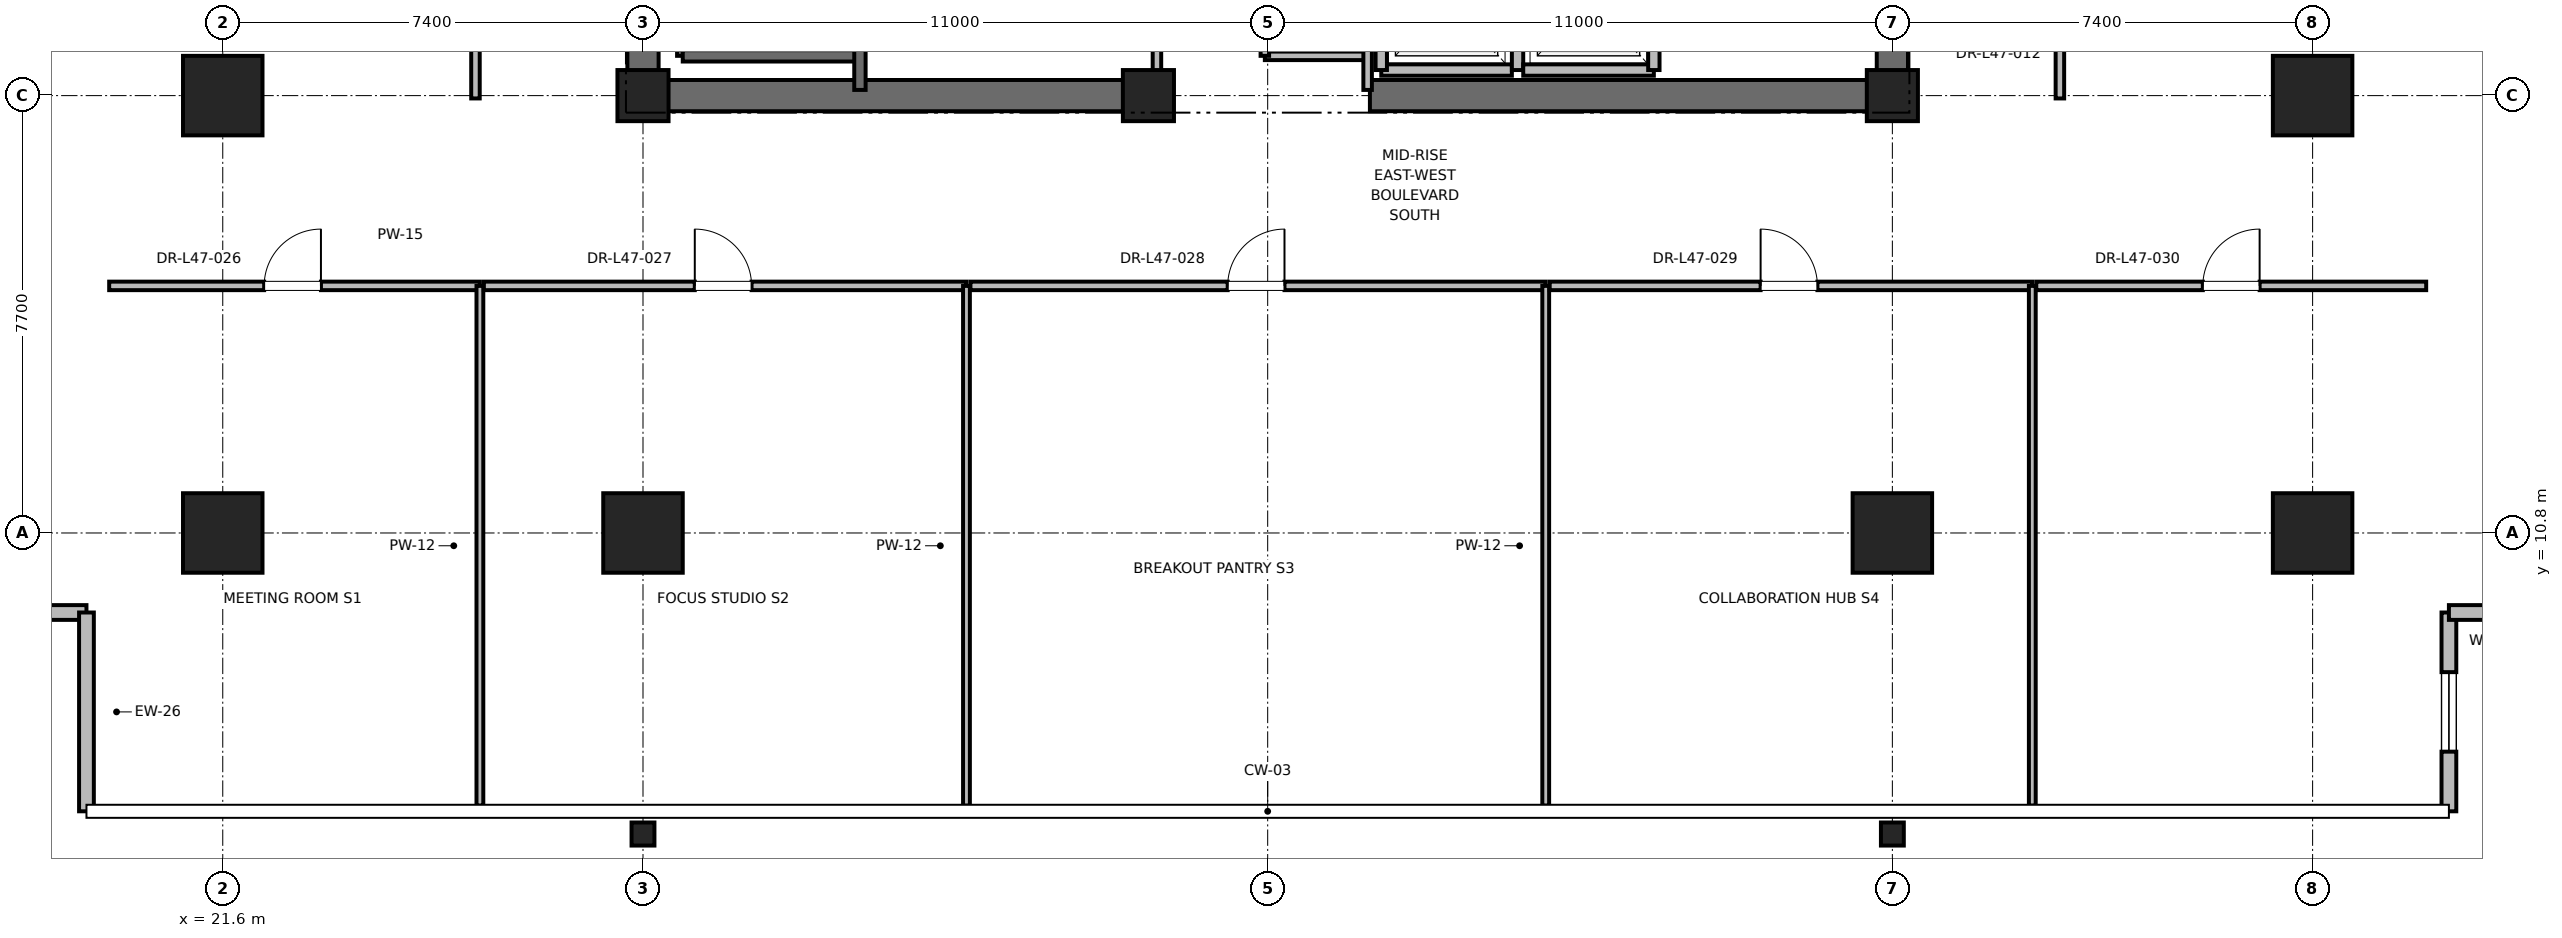
"""IFC4 building model, lengths in metres.
Left out: names, types, materials, properties, quantities, classifications, styles, units other than length and angle.
Written with IfcOpenShell. Run it as: python <this file> out.ifc"""

import sys

from ifc_helpers import new_model, si_unit, direction, frame, frame_2d, origin, origin_2d, place, context, subcontext, project, spatial, rectangle, i_section, extrude, element, fill, save


model = new_model("IFC4")
c1 = context("Model", 3, precision=1e-05, world=origin(), true_north=direction((0.0, 1.0)))
c2 = subcontext(c1, "Body", "Model", "MODEL_VIEW")
j1 = project(units=[si_unit("LENGTHUNIT", "METRE"), si_unit("PLANEANGLEUNIT", "RADIAN")], contexts=[c1])
p1 = place(None, origin())
s1 = spatial("IfcSite", under=j1, at=p1, CompositionType="ELEMENT")
p2 = place(p1, origin())
s2 = spatial("IfcBuilding", under=s1, at=p2, CompositionType="ELEMENT")
p3 = place(p2, frame((0.0, 0.0, 205.2)))
s3 = spatial("IfcBuildingStorey", under=s2, at=p3, CompositionType="ELEMENT", Elevation=205.2)
for number, where, z_axis, x_axis in (
    (1, (29.0, 10.8, 0.0), (0.0, 0.0, 1.0), (1.0, 0.0, 0.0)),
    (2, (51.0, 10.8, 0.0), (0.0, 0.0, 1.0), (1.0, 0.0, 0.0)),
    (3, (21.6, 18.5, 0.0), (0.0, 0.0, 1.0), (1.0, 0.0, 0.0)),
    (4, (58.4, 18.5, 0.0), (0.0, 0.0, 1.0), (1.0, 0.0, 0.0)),
    (5, (21.6, 10.8, 0.0), (0.0, 0.0, 1.0), (1.0, 0.0, 0.0)),
    (6, (58.4, 10.8, 0.0), (0.0, 0.0, 1.0), (1.0, 0.0, 0.0)),
):
    element("IfcColumn", number, at=place(p3, frame(where, z_axis=z_axis, x_axis=x_axis)), inside=s3, PredefinedType="COLUMN", context=c2, shape_type="SweptSolid", body=[
        extrude(rectangle(XDim=1.4, YDim=1.4, at=origin_2d()), origin(), (0.0, 0.0, 1.0), 4.0),
    ])
for number, where, z_axis, x_axis in (
    (7, (29.0, 5.5, 0.0), (0.0, 0.0, 1.0), (1.0, 0.0, 0.0)),
    (8, (51.0, 5.5, 0.0), (0.0, 0.0, 1.0), (1.0, 0.0, 0.0)),
):
    element("IfcColumn", number, at=place(p3, frame(where, z_axis=z_axis, x_axis=x_axis)), inside=s3, PredefinedType="COLUMN", context=c2, shape_type="SweptSolid", body=[
        extrude(i_section(OverallWidth=0.403, OverallDepth=0.406, WebThickness=0.027, FlangeThickness=0.043, FilletRadius=0.015, at=origin_2d()), origin(), (0.0, 0.0, 1.0), 4.0),
    ])
for number, where, z_axis, x_axis in (
    (9, (29.0, 18.5, 0.0), (0.0, 0.0, 1.0), (1.0, 0.0, 0.0)),
    (10, (51.0, 18.5, 0.0), (0.0, 0.0, 1.0), (1.0, 0.0, 0.0)),
    (11, (37.9, 18.5, 0.0), (0.0, 0.0, 1.0), (1.0, 0.0, 0.0)),
):
    element("IfcColumn", number, at=place(p3, frame(where, z_axis=z_axis, x_axis=x_axis)), inside=s3, PredefinedType="PILASTER", context=c2, shape_type="SweptSolid", body=[
        extrude(rectangle(XDim=0.9, YDim=0.9, at=origin_2d()), origin(), (0.0, 0.0, 1.0), 4.0),
    ])
for number, where, z_axis, x_axis in (
    (12, (29.0, 18.5, 0.0), (0.0, 0.0, 1.0), (1.0, 0.0, 0.0)),
    (13, (41.8, 18.5, 0.0), (0.0, 0.0, 1.0), (1.0, 0.0, 0.0)),
):
    element("IfcWall", number, at=place(p3, frame(where, z_axis=z_axis, x_axis=x_axis)), inside=s3, PredefinedType="SHEAR", context=c2, shape_type="SweptSolid", body=[
        extrude(rectangle(XDim=9.2, YDim=0.55, at=frame_2d((4.6, 0.0))), origin(), (0.0, 0.0, 1.0), 3.775),
    ])
p4 = place(p3, frame((29.0, 18.5, 0.0), z_axis=(0.0, 0.0, 1.0), x_axis=(0.0, 1.0, 0.0)))
e14 = element("IfcWall", 14, at=p4, inside=s3, PredefinedType="SHEAR", context=c2, shape_type="SweptSolid", body=[
    extrude(rectangle(XDim=8.8, YDim=0.55, at=frame_2d((4.4, 0.0))), origin(), (0.0, 0.0, 1.0), 3.775),
])
p5 = place(p3, frame((51.0, 18.5, 0.0), z_axis=(0.0, 0.0, 1.0), x_axis=(0.0, 1.0, 0.0)))
e15 = element("IfcWall", 15, at=p5, inside=s3, PredefinedType="SHEAR", context=c2, shape_type="SweptSolid", body=[
    extrude(rectangle(XDim=5.8, YDim=0.55, at=frame_2d((2.9, 0.0))), origin(), (0.0, 0.0, 1.0), 3.775),
])
p6 = place(p3, frame((15.2, 9.4, 0.0), z_axis=(0.0, 0.0, 1.0), x_axis=(1.0, 0.0, 0.0)))
e16 = element("IfcWall", 16, at=p6, inside=s3, PredefinedType="PARAPET", context=c2, shape_type="SweptSolid", body=[
    extrude(rectangle(XDim=4.0, YDim=0.26, at=frame_2d((2.0, 0.0))), origin(), (0.0, 0.0, 1.0), 3.775),
])
p7 = place(p6, frame((1.3, 0.0, 0.85)))
e17 = element("IfcOpeningElement", 17, at=p7, cuts=e16, PredefinedType="OPENING", context=c2, shape_type="SweptSolid", body=[
    extrude(rectangle(XDim=1.4, YDim=2.0, at=frame_2d((0.7, 1.0))), frame((0.0, 0.13, 0.0), z_axis=(0.0, -1.0, 0.0), x_axis=(1.0, 0.0, 0.0)), (0.0, 0.0, 1.0), 0.26),
])
p8 = place(p3, frame((19.2, 9.4, 0.0), z_axis=(0.0, 0.0, 1.0), x_axis=(0.0, -1.0, 0.0)))
e18 = element("IfcWall", 18, at=p8, inside=s3, PredefinedType="PARAPET", context=c2, shape_type="SweptSolid", body=[
    extrude(rectangle(XDim=3.5, YDim=0.26, at=frame_2d((1.75, 0.0))), origin(), (0.0, 0.0, 1.0), 3.775),
])
p9 = place(p3, frame((60.8, 5.9, 0.0), z_axis=(0.0, 0.0, 1.0), x_axis=(0.0, 1.0, 0.0)))
e19 = element("IfcWall", 19, at=p9, inside=s3, PredefinedType="PARAPET", context=c2, shape_type="SweptSolid", body=[
    extrude(rectangle(XDim=3.5, YDim=0.26, at=frame_2d((1.75, 0.0))), origin(), (0.0, 0.0, 1.0), 3.775),
])
p10 = place(p9, frame((1.05, 0.0, 0.85)))
e20 = element("IfcOpeningElement", 20, at=p10, cuts=e19, PredefinedType="OPENING", context=c2, shape_type="SweptSolid", body=[
    extrude(rectangle(XDim=1.4, YDim=2.0, at=frame_2d((0.7, 1.0))), frame((0.0, 0.13, 0.0), z_axis=(0.0, -1.0, 0.0), x_axis=(1.0, 0.0, 0.0)), (0.0, 0.0, 1.0), 0.26),
])
p11 = place(p3, frame((60.8, 9.4, 0.0), z_axis=(0.0, 0.0, 1.0), x_axis=(1.0, 0.0, 0.0)))
e21 = element("IfcWall", 21, at=p11, inside=s3, PredefinedType="PARAPET", context=c2, shape_type="SweptSolid", body=[
    extrude(rectangle(XDim=4.0, YDim=0.26, at=frame_2d((2.0, 0.0))), origin(), (0.0, 0.0, 1.0), 3.775),
])
p12 = place(p3, frame((29.7, 19.2, 0.0), z_axis=(0.0, 0.0, 1.0), x_axis=(0.0, 1.0, 0.0)))
e22 = element("IfcWall", 22, at=p12, inside=s3, PredefinedType="SOLIDWALL", context=c2, shape_type="SweptSolid", body=[
    extrude(rectangle(XDim=8.15, YDim=0.2, at=frame_2d((4.075, 0.0))), origin(), (0.0, 0.0, 1.0), 3.775),
])
p13 = place(p3, frame((29.7, 19.2, 0.0), z_axis=(0.0, 0.0, 1.0), x_axis=(1.0, 0.0, 0.0)))
e23 = element("IfcWall", 23, at=p13, inside=s3, PredefinedType="SOLIDWALL", context=c2, shape_type="SweptSolid", body=[
    extrude(rectangle(XDim=3.12, YDim=0.2, at=frame_2d((1.56, 0.0))), origin(), (0.0, 0.0, 1.0), 3.775),
])
p14 = place(p3, frame((32.82, 18.6, 0.0), z_axis=(0.0, 0.0, 1.0), x_axis=(0.0, 1.0, 0.0)))
e24 = element("IfcWall", 24, at=p14, inside=s3, PredefinedType="SOLIDWALL", context=c2, shape_type="SweptSolid", body=[
    extrude(rectangle(XDim=8.78, YDim=0.2, at=frame_2d((4.39, 0.0))), origin(), (0.0, 0.0, 1.0), 3.775),
])
p15 = place(p3, frame((42.0, 18.95, 0.0), z_axis=(0.0, 0.0, 1.0), x_axis=(1.0, 0.0, 0.0)))
e25 = element("IfcWall", 25, at=p15, inside=s3, PredefinedType="SOLIDWALL", context=c2, shape_type="SweptSolid", body=[
    extrude(rectangle(XDim=2.3, YDim=0.2, at=frame_2d((1.15, 0.0))), origin(), (0.0, 0.0, 1.0), 2.755),
])
p16 = place(p3, frame((42.0, 21.55, 0.0), z_axis=(0.0, 0.0, 1.0), x_axis=(0.0, -1.0, 0.0)))
e26 = element("IfcWall", 26, at=p16, inside=s3, PredefinedType="SOLIDWALL", context=c2, shape_type="SweptSolid", body=[
    extrude(rectangle(XDim=2.6, YDim=0.2, at=frame_2d((1.3, 0.0))), origin(), (0.0, 0.0, 1.0), 2.755),
])
p17 = place(p3, frame((44.4, 18.95, 0.0), z_axis=(0.0, 0.0, 1.0), x_axis=(0.0, 1.0, 0.0)))
e27 = element("IfcWall", 27, at=p17, inside=s3, PredefinedType="SOLIDWALL", context=c2, shape_type="SweptSolid", body=[
    extrude(rectangle(XDim=2.6, YDim=0.2, at=frame_2d((1.3, 0.0))), origin(), (0.0, 0.0, 1.0), 3.775),
])
p18 = place(p3, frame((44.5, 18.95, 0.0), z_axis=(0.0, 0.0, 1.0), x_axis=(1.0, 0.0, 0.0)))
e28 = element("IfcWall", 28, at=p18, inside=s3, PredefinedType="SOLIDWALL", context=c2, shape_type="SweptSolid", body=[
    extrude(rectangle(XDim=2.3, YDim=0.2, at=frame_2d((1.15, 0.0))), origin(), (0.0, 0.0, 1.0), 3.775),
])
p19 = place(p3, frame((46.8, 18.95, 0.0), z_axis=(0.0, 0.0, 1.0), x_axis=(0.0, 1.0, 0.0)))
e29 = element("IfcWall", 29, at=p19, inside=s3, PredefinedType="SOLIDWALL", context=c2, shape_type="SweptSolid", body=[
    extrude(rectangle(XDim=2.6, YDim=0.2, at=frame_2d((1.3, 0.0))), origin(), (0.0, 0.0, 1.0), 3.775),
])
p20 = place(p3, frame((39.95, 19.2, 0.0), z_axis=(0.0, 0.0, 1.0), x_axis=(1.0, 0.0, 0.0)))
e30 = element("IfcWall", 30, at=p20, inside=s3, PredefinedType="PARTITIONING", context=c2, shape_type="SweptSolid", body=[
    extrude(rectangle(XDim=1.81, YDim=0.15, at=frame_2d((0.905, 0.0))), origin(), (0.0, 0.0, 1.0), 2.85),
])
p21 = place(p3, frame((41.76, 18.6, 0.0), z_axis=(0.0, 0.0, 1.0), x_axis=(0.0, 1.0, 0.0)))
e31 = element("IfcWall", 31, at=p21, inside=s3, PredefinedType="PARTITIONING", context=c2, shape_type="SweptSolid", body=[
    extrude(rectangle(XDim=3.6, YDim=0.15, at=frame_2d((1.8, 0.0))), origin(), (0.0, 0.0, 1.0), 2.755),
])
p22 = place(p3, frame((39.95, 19.2, 0.0), z_axis=(0.0, 0.0, 1.0), x_axis=(0.0, 1.0, 0.0)))
e32 = element("IfcWall", 32, at=p22, inside=s3, PredefinedType="PARTITIONING", context=c2, shape_type="SweptSolid", body=[
    extrude(rectangle(XDim=3.0, YDim=0.15, at=frame_2d((1.5, 0.0))), origin(), (0.0, 0.0, 1.0), 2.85),
])
p23 = place(p22, frame((1.05, 0.0, 0.0)))
e33 = element("IfcOpeningElement", 33, at=p23, cuts=e32, PredefinedType="OPENING", context=c2, shape_type="SweptSolid", body=[
    extrude(rectangle(XDim=0.9, YDim=2.1, at=frame_2d((0.45, 1.05))), frame((0.0, 0.075, 0.0), z_axis=(0.0, -1.0, 0.0), x_axis=(1.0, 0.0, 0.0)), (0.0, 0.0, 1.0), 0.15),
])
p24 = place(p3, frame((38.05, 18.6, 0.0), z_axis=(0.0, 0.0, 1.0), x_axis=(0.0, 1.0, 0.0)))
e34 = element("IfcWall", 34, at=p24, inside=s3, PredefinedType="PARTITIONING", context=c2, shape_type="SweptSolid", body=[
    extrude(rectangle(XDim=4.46, YDim=0.15, at=frame_2d((2.23, 0.0))), origin(), (0.0, 0.0, 1.0), 2.755),
])
p25 = place(p24, frame((1.73, 0.0, 0.0)))
e35 = element("IfcOpeningElement", 35, at=p25, cuts=e34, PredefinedType="OPENING", context=c2, shape_type="SweptSolid", body=[
    extrude(rectangle(XDim=1.0, YDim=2.15, at=frame_2d((0.5, 1.075))), frame((0.0, 0.075, 0.0), z_axis=(0.0, -1.0, 0.0), x_axis=(1.0, 0.0, 0.0)), (0.0, 0.0, 1.0), 0.15),
])
p26 = place(p3, frame((19.6, 15.15, 0.0), z_axis=(0.0, 0.0, 1.0), x_axis=(1.0, 0.0, 0.0)))
e36 = element("IfcWall", 36, at=p26, inside=s3, PredefinedType="PARTITIONING", context=c2, shape_type="SweptSolid", body=[
    extrude(rectangle(XDim=6.528, YDim=0.15, at=frame_2d((3.264, 0.0))), origin(), (0.0, 0.0, 1.0), 2.85),
])
p27 = place(p26, frame((2.729, 0.0, 0.0)))
e37 = element("IfcOpeningElement", 37, at=p27, cuts=e36, PredefinedType="OPENING", context=c2, shape_type="SweptSolid", body=[
    extrude(rectangle(XDim=1.0, YDim=2.15, at=frame_2d((0.5, 1.075))), frame((0.0, 0.075, 0.0), z_axis=(0.0, -1.0, 0.0), x_axis=(1.0, 0.0, 0.0)), (0.0, 0.0, 1.0), 0.15),
])
p28 = place(p3, frame((26.128, 6.0, 0.0), z_axis=(0.0, 0.0, 1.0), x_axis=(0.0, 1.0, 0.0)))
e38 = element("IfcWall", 38, at=p28, inside=s3, PredefinedType="PARTITIONING", context=c2, shape_type="SweptSolid", body=[
    extrude(rectangle(XDim=9.15, YDim=0.12, at=frame_2d((4.575, 0.0))), origin(), (0.0, 0.0, 1.0), 2.85),
])
p29 = place(p3, frame((26.198, 15.15, 0.0), z_axis=(0.0, 0.0, 1.0), x_axis=(1.0, 0.0, 0.0)))
e39 = element("IfcWall", 39, at=p29, inside=s3, PredefinedType="PARTITIONING", context=c2, shape_type="SweptSolid", body=[
    extrude(rectangle(XDim=8.498, YDim=0.15, at=frame_2d((4.249, 0.0))), origin(), (0.0, 0.0, 1.0), 2.85),
])
p30 = place(p29, frame((3.714, 0.0, 0.0)))
e40 = element("IfcOpeningElement", 40, at=p30, cuts=e39, PredefinedType="OPENING", context=c2, shape_type="SweptSolid", body=[
    extrude(rectangle(XDim=1.0, YDim=2.15, at=frame_2d((0.5, 1.075))), frame((0.0, 0.075, 0.0), z_axis=(0.0, -1.0, 0.0), x_axis=(1.0, 0.0, 0.0)), (0.0, 0.0, 1.0), 0.15),
])
p31 = place(p3, frame((34.696, 6.0, 0.0), z_axis=(0.0, 0.0, 1.0), x_axis=(0.0, 1.0, 0.0)))
e41 = element("IfcWall", 41, at=p31, inside=s3, PredefinedType="PARTITIONING", context=c2, shape_type="SweptSolid", body=[
    extrude(rectangle(XDim=9.15, YDim=0.12, at=frame_2d((4.575, 0.0))), origin(), (0.0, 0.0, 1.0), 2.405),
])
p32 = place(p3, frame((34.766, 15.15, 0.0), z_axis=(0.0, 0.0, 1.0), x_axis=(1.0, 0.0, 0.0)))
e42 = element("IfcWall", 42, at=p32, inside=s3, PredefinedType="PARTITIONING", context=c2, shape_type="SweptSolid", body=[
    extrude(rectangle(XDim=10.13, YDim=0.15, at=frame_2d((5.065, 0.0))), origin(), (0.0, 0.0, 1.0), 2.85),
])
p33 = place(p32, frame((4.53, 0.0, 0.0)))
e43 = element("IfcOpeningElement", 43, at=p33, cuts=e42, PredefinedType="OPENING", context=c2, shape_type="SweptSolid", body=[
    extrude(rectangle(XDim=1.0, YDim=2.15, at=frame_2d((0.5, 1.075))), frame((0.0, 0.075, 0.0), z_axis=(0.0, -1.0, 0.0), x_axis=(1.0, 0.0, 0.0)), (0.0, 0.0, 1.0), 0.15),
])
p34 = place(p3, frame((44.896, 6.0, 0.0), z_axis=(0.0, 0.0, 1.0), x_axis=(0.0, 1.0, 0.0)))
e44 = element("IfcWall", 44, at=p34, inside=s3, PredefinedType="PARTITIONING", context=c2, shape_type="SweptSolid", body=[
    extrude(rectangle(XDim=9.15, YDim=0.12, at=frame_2d((4.575, 0.0))), origin(), (0.0, 0.0, 1.0), 2.405),
])
p35 = place(p3, frame((44.966, 15.15, 0.0), z_axis=(0.0, 0.0, 1.0), x_axis=(1.0, 0.0, 0.0)))
e45 = element("IfcWall", 45, at=p35, inside=s3, PredefinedType="PARTITIONING", context=c2, shape_type="SweptSolid", body=[
    extrude(rectangle(XDim=8.498, YDim=0.15, at=frame_2d((4.249, 0.0))), origin(), (0.0, 0.0, 1.0), 2.85),
])
p36 = place(p35, frame((3.714, 0.0, 0.0)))
e46 = element("IfcOpeningElement", 46, at=p36, cuts=e45, PredefinedType="OPENING", context=c2, shape_type="SweptSolid", body=[
    extrude(rectangle(XDim=1.0, YDim=2.15, at=frame_2d((0.5, 1.075))), frame((0.0, 0.075, 0.0), z_axis=(0.0, -1.0, 0.0), x_axis=(1.0, 0.0, 0.0)), (0.0, 0.0, 1.0), 0.15),
])
p37 = place(p3, frame((53.464, 6.0, 0.0), z_axis=(0.0, 0.0, 1.0), x_axis=(0.0, 1.0, 0.0)))
e47 = element("IfcWall", 47, at=p37, inside=s3, PredefinedType="PARTITIONING", context=c2, shape_type="SweptSolid", body=[
    extrude(rectangle(XDim=9.15, YDim=0.12, at=frame_2d((4.575, 0.0))), origin(), (0.0, 0.0, 1.0), 2.85),
])
p38 = place(p3, frame((53.534, 15.15, 0.0), z_axis=(0.0, 0.0, 1.0), x_axis=(1.0, 0.0, 0.0)))
e48 = element("IfcWall", 48, at=p38, inside=s3, PredefinedType="PARTITIONING", context=c2, shape_type="SweptSolid", body=[
    extrude(rectangle(XDim=6.866, YDim=0.15, at=frame_2d((3.433, 0.0))), origin(), (0.0, 0.0, 1.0), 2.85),
])
p39 = place(p38, frame((2.933, 0.0, 0.0)))
e49 = element("IfcOpeningElement", 49, at=p39, cuts=e48, PredefinedType="OPENING", context=c2, shape_type="SweptSolid", body=[
    extrude(rectangle(XDim=1.0, YDim=2.15, at=frame_2d((0.5, 1.075))), frame((0.0, 0.075, 0.0), z_axis=(0.0, -1.0, 0.0), x_axis=(1.0, 0.0, 0.0)), (0.0, 0.0, 1.0), 0.15),
])
p40 = place(p3, frame((26.05, 18.45, 0.0), z_axis=(0.0, 0.0, 1.0), x_axis=(0.0, 1.0, 0.0)))
e50 = element("IfcWall", 50, at=p40, inside=s3, PredefinedType="PARTITIONING", context=c2, shape_type="SweptSolid", body=[
    extrude(rectangle(XDim=5.249, YDim=0.15, at=frame_2d((2.625, 0.0))), origin(), (0.0, 0.0, 1.0), 2.85),
])
p41 = place(p40, frame((2.165, 0.0, 0.0)))
e51 = element("IfcOpeningElement", 51, at=p41, cuts=e50, PredefinedType="OPENING", context=c2, shape_type="SweptSolid", body=[
    extrude(rectangle(XDim=1.0, YDim=2.15, at=frame_2d((0.5, 1.075))), frame((0.0, 0.075, 0.0), z_axis=(0.0, -1.0, 0.0), x_axis=(1.0, 0.0, 0.0)), (0.0, 0.0, 1.0), 0.15),
])
p42 = place(p3, frame((53.95, 18.45, 0.0), z_axis=(0.0, 0.0, 1.0), x_axis=(0.0, 1.0, 0.0)))
e52 = element("IfcWall", 52, at=p42, inside=s3, PredefinedType="PARTITIONING", context=c2, shape_type="SweptSolid", body=[
    extrude(rectangle(XDim=3.982, YDim=0.15, at=frame_2d((1.991, 0.0))), origin(), (0.0, 0.0, 1.0), 2.85),
])
p43 = place(p42, frame((1.531, 0.0, 0.0)))
e53 = element("IfcOpeningElement", 53, at=p43, cuts=e52, PredefinedType="OPENING", context=c2, shape_type="SweptSolid", body=[
    extrude(rectangle(XDim=1.0, YDim=2.15, at=frame_2d((0.5, 1.075))), frame((0.0, 0.075, 0.0), z_axis=(0.0, -1.0, 0.0), x_axis=(1.0, 0.0, 0.0)), (0.0, 0.0, 1.0), 0.15),
])
p44 = place(p10, origin())
e54 = element("IfcWindow", 54, at=p44, inside=s3, PartitioningType="SINGLE_PANEL", PredefinedType="WINDOW", context=c2, shape_type="SweptSolid", body=[
    extrude(rectangle(XDim=1.4, YDim=2.0, at=frame_2d((0.7, 1.0))), frame((0.0, 0.03, 0.0), z_axis=(0.0, -1.0, 0.0), x_axis=(1.0, 0.0, 0.0)), (0.0, 0.0, 1.0), 0.06),
])
fill(e20, e54)
p45 = place(p27, origin())
e55 = element("IfcDoor", 55, at=p45, inside=s3, OperationType="SINGLE_SWING_RIGHT", PredefinedType="DOOR", context=c2, shape_type="SweptSolid", body=[
    extrude(rectangle(XDim=1.0, YDim=2.15, at=frame_2d((0.5, 1.075))), frame((0.0, 0.025, 0.0), z_axis=(0.0, -1.0, 0.0), x_axis=(1.0, 0.0, 0.0)), (0.0, 0.0, 1.0), 0.05),
])
fill(e37, e55)
p46 = place(p30, origin())
e56 = element("IfcDoor", 56, at=p46, inside=s3, OperationType="SINGLE_SWING_LEFT", PredefinedType="DOOR", context=c2, shape_type="SweptSolid", body=[
    extrude(rectangle(XDim=1.0, YDim=2.15, at=frame_2d((0.5, 1.075))), frame((0.0, 0.025, 0.0), z_axis=(0.0, -1.0, 0.0), x_axis=(1.0, 0.0, 0.0)), (0.0, 0.0, 1.0), 0.05),
])
fill(e40, e56)
p47 = place(p33, origin())
e57 = element("IfcDoor", 57, at=p47, inside=s3, OperationType="SINGLE_SWING_RIGHT", PredefinedType="DOOR", context=c2, shape_type="SweptSolid", body=[
    extrude(rectangle(XDim=1.0, YDim=2.15, at=frame_2d((0.5, 1.075))), frame((0.0, 0.025, 0.0), z_axis=(0.0, -1.0, 0.0), x_axis=(1.0, 0.0, 0.0)), (0.0, 0.0, 1.0), 0.05),
])
fill(e43, e57)
p48 = place(p36, origin())
e58 = element("IfcDoor", 58, at=p48, inside=s3, OperationType="SINGLE_SWING_LEFT", PredefinedType="DOOR", context=c2, shape_type="SweptSolid", body=[
    extrude(rectangle(XDim=1.0, YDim=2.15, at=frame_2d((0.5, 1.075))), frame((0.0, 0.025, 0.0), z_axis=(0.0, -1.0, 0.0), x_axis=(1.0, 0.0, 0.0)), (0.0, 0.0, 1.0), 0.05),
])
fill(e46, e58)
p49 = place(p39, origin())
e59 = element("IfcDoor", 59, at=p49, inside=s3, OperationType="SINGLE_SWING_RIGHT", PredefinedType="DOOR", context=c2, shape_type="SweptSolid", body=[
    extrude(rectangle(XDim=1.0, YDim=2.15, at=frame_2d((0.5, 1.075))), frame((0.0, 0.025, 0.0), z_axis=(0.0, -1.0, 0.0), x_axis=(1.0, 0.0, 0.0)), (0.0, 0.0, 1.0), 0.05),
])
fill(e49, e59)
save(model, sys.argv[1])
